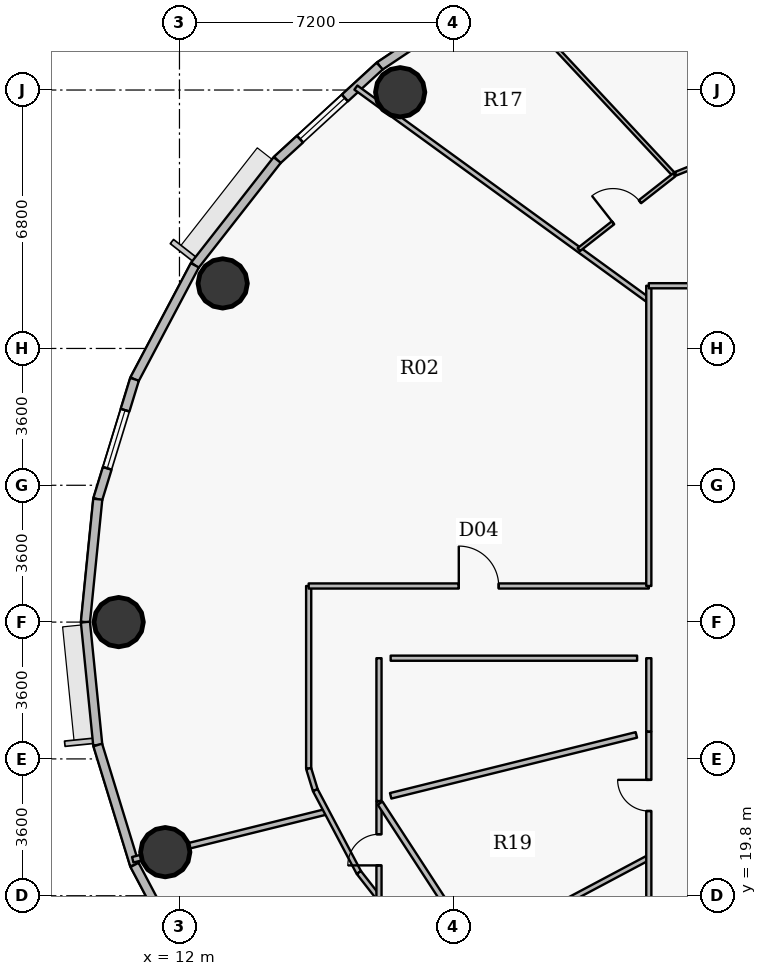
"""IFC4 building model, lengths in metres.
Left out: names, types, materials, properties, quantities, classifications, styles, units other than length and angle.
Written with IfcOpenShell. Run it as: python <this file> out.ifc"""

import sys

from ifc_helpers import new_model, si_unit, direction, frame, frame_2d, origin, origin_2d, place, context, subcontext, project, spatial, rectangle, hollow_circle, extrude, source, transform, mapped, element, fill, save


model = new_model("IFC4")
c1 = context("Model", 3, precision=1e-05, world=origin(), true_north=direction((0.0, 1.0)))
c2 = subcontext(c1, "Body", "Model", "MODEL_VIEW")
j1 = project(units=[si_unit("LENGTHUNIT", "METRE"), si_unit("PLANEANGLEUNIT", "RADIAN")], contexts=[c1])
p1 = place(None, origin())
s1 = spatial("IfcSite", under=j1, at=p1, CompositionType="ELEMENT")
p2 = place(p1, origin())
s2 = spatial("IfcBuilding", under=s1, at=p2, CompositionType="ELEMENT")
p3 = place(p2, frame((0.0, 0.0, 197.4)))
s3 = spatial("IfcBuildingStorey", under=s2, at=p3, CompositionType="ELEMENT", Elevation=197.4)
for number, where, z_axis, x_axis in (
    (1, (17.808, 40.942, 0.0), (0.0, 0.0, 1.0), (1.0, 0.0, 0.0)),
    (2, (13.137, 35.911, 0.0), (0.0, 0.0, 1.0), (1.0, 0.0, 0.0)),
    (3, (10.4, 27.0, 0.0), (0.0, 0.0, 1.0), (1.0, 0.0, 0.0)),
    (4, (11.625, 20.947, 0.0), (0.0, 0.0, 1.0), (1.0, 0.0, 0.0)),
):
    element("IfcColumn", number, at=place(p3, frame(where, z_axis=z_axis, x_axis=x_axis)), inside=s3, PredefinedType="COLUMN", context=c2, shape_type="SweptSolid", body=[
        extrude(hollow_circle(Radius=0.65, WallThickness=0.04, at=origin_2d()), origin(), (0.0, 0.0, 1.0), 3.75),
    ])
p4 = place(p3, frame((17.268, 41.631, 0.0), z_axis=(0.0, 0.0, 1.0), x_axis=(0.831228998277, 0.555930168657, 0.0)))
e5 = element("IfcWall", 5, at=p4, inside=s3, PredefinedType="SOLIDWALL", context=c2, shape_type="SweptSolid", body=[
    extrude(rectangle(XDim=3.8, YDim=0.24, at=frame_2d((1.9, 0.0))), origin(), (0.0, 0.0, 1.0), 3.5),
])
p5 = place(p3, frame((14.572, 39.158, 0.0), z_axis=(0.0, 0.0, 1.0), x_axis=(0.737076565834, 0.675809245349, 0.0)))
e6 = element("IfcWall", 6, at=p5, inside=s3, PredefinedType="SOLIDWALL", context=c2, shape_type="SweptSolid", body=[
    extrude(rectangle(XDim=3.658, YDim=0.24, at=frame_2d((1.829, 0.0))), origin(), (0.0, 0.0, 1.0), 3.5),
])
p6 = place(p5, frame((0.815, 0.0, 0.9)))
e7 = element("IfcOpeningElement", 7, at=p6, cuts=e6, PredefinedType="OPENING", context=c2, shape_type="SweptSolid", body=[
    extrude(rectangle(XDim=1.6, YDim=1.75, at=origin_2d()), frame((0.8, 0.13, 0.875), z_axis=(0.0, -1.0, 0.0), x_axis=(1.0, 0.0, 0.0)), (0.0, 0.0, 1.0), 0.26),
])
p7 = place(p3, frame((12.404, 36.388, 0.0), z_axis=(0.0, 0.0, 1.0), x_axis=(0.616287674549, 0.787521112224, 0.0)))
e8 = element("IfcWall", 8, at=p7, inside=s3, PredefinedType="SOLIDWALL", context=c2, shape_type="SweptSolid", body=[
    extrude(rectangle(XDim=3.517, YDim=0.24, at=frame_2d((1.759, 0.0))), origin(), (0.0, 0.0, 1.0), 3.5),
])
p8 = place(p3, frame((10.817, 33.389, 0.0), z_axis=(0.0, 0.0, 1.0), x_axis=(0.467586874938, 0.88394712194, 0.0)))
e9 = element("IfcWall", 9, at=p8, inside=s3, PredefinedType="SOLIDWALL", context=c2, shape_type="SweptSolid", body=[
    extrude(rectangle(XDim=3.393, YDim=0.24, at=frame_2d((1.697, 0.0))), origin(), (0.0, 0.0, 1.0), 3.5),
])
p9 = place(p3, frame((9.85, 30.234, 0.0), z_axis=(0.0, 0.0, 1.0), x_axis=(0.293097995113, 0.956082405058, 0.0)))
e10 = element("IfcWall", 10, at=p9, inside=s3, PredefinedType="SOLIDWALL", context=c2, shape_type="SweptSolid", body=[
    extrude(rectangle(XDim=3.3, YDim=0.24, at=frame_2d((1.65, 0.0))), origin(), (0.0, 0.0, 1.0), 3.5),
])
p10 = place(p9, frame((0.85, 0.0, 0.9)))
e11 = element("IfcOpeningElement", 11, at=p10, cuts=e10, PredefinedType="OPENING", context=c2, shape_type="SweptSolid", body=[
    extrude(rectangle(XDim=1.6, YDim=1.75, at=origin_2d()), frame((0.8, 0.13, 0.875), z_axis=(0.0, -1.0, 0.0), x_axis=(1.0, 0.0, 0.0)), (0.0, 0.0, 1.0), 0.26),
])
for number, where, z_axis, x_axis in (
    (12, (9.525, 27.0, 0.0), (0.0, 0.0, 1.0), (0.1, 0.995, 0.0)),
    (13, (9.85, 23.766, 0.0), (0.0, 0.0, 1.0), (-0.1, 0.995, 0.0)),
):
    element("IfcWall", number, at=place(p3, frame(where, z_axis=z_axis, x_axis=x_axis)), inside=s3, PredefinedType="SOLIDWALL", context=c2, shape_type="SweptSolid", body=[
        extrude(rectangle(XDim=3.25, YDim=0.24, at=frame_2d((1.625, 0.0))), origin(), (0.0, 0.0, 1.0), 3.5),
    ])
p11 = place(p3, frame((10.817, 20.611, 0.0), z_axis=(0.0, 0.0, 1.0), x_axis=(-0.293097995113, 0.956082405058, 0.0)))
e14 = element("IfcWall", 14, at=p11, inside=s3, PredefinedType="SOLIDWALL", context=c2, shape_type="SweptSolid", body=[
    extrude(rectangle(XDim=3.3, YDim=0.24, at=frame_2d((1.65, 0.0))), origin(), (0.0, 0.0, 1.0), 3.5),
])
p12 = place(p3, frame((12.404, 17.612, 0.0), z_axis=(0.0, 0.0, 1.0), x_axis=(-0.467586874938, 0.88394712194, 0.0)))
e15 = element("IfcWall", 15, at=p12, inside=s3, PredefinedType="SOLIDWALL", context=c2, shape_type="SweptSolid", body=[
    extrude(rectangle(XDim=3.393, YDim=0.24, at=frame_2d((1.697, 0.0))), origin(), (0.0, 0.0, 1.0), 3.5),
])
p13 = place(p3, frame((10.771, 20.747, 0.0), z_axis=(0.0, 0.0, 1.0), x_axis=(0.970640303721, 0.240535653891, 0.0)))
e16 = element("IfcWall", 16, at=p13, inside=s3, PredefinedType="PARTITIONING", context=c2, shape_type="SweptSolid", body=[
    extrude(rectangle(XDim=5.258, YDim=0.15, at=frame_2d((2.629, 0.0))), origin(), (0.0, 0.0, 1.0), 2.935),
])
p14 = place(p3, frame((15.4, 23.146, 0.0), z_axis=(0.0, 0.0, 1.0), x_axis=(0.0, 1.0, 0.0)))
e17 = element("IfcWall", 17, at=p14, inside=s3, PredefinedType="PARTITIONING", context=c2, shape_type="SweptSolid", body=[
    extrude(rectangle(XDim=4.804, YDim=0.135, at=frame_2d((2.402, 0.0))), origin(), (0.0, 0.0, 1.0), 2.935),
])
p15 = place(p3, frame((15.4, 23.146, 0.0), z_axis=(0.0, 0.0, 1.0), x_axis=(0.293335154151, -0.956009669061, 0.0)))
e18 = element("IfcWall", 18, at=p15, inside=s3, PredefinedType="PARTITIONING", context=c2, shape_type="SweptSolid", body=[
    extrude(rectangle(XDim=0.594, YDim=0.135, at=frame_2d((0.297, 0.0))), origin(), (0.0, 0.0, 1.0), 3.5),
])
p16 = place(p3, frame((15.4, 27.95, 0.0), z_axis=(0.0, 0.0, 1.0), x_axis=(1.0, 0.0, 0.0)))
e19 = element("IfcWall", 19, at=p16, inside=s3, PredefinedType="PARTITIONING", context=c2, shape_type="SweptSolid", body=[
    extrude(rectangle(XDim=8.95, YDim=0.135, at=frame_2d((4.475, 0.0))), origin(), (0.0, 0.0, 1.0), 3.5),
])
p17 = place(p16, frame((3.95, 0.0, 0.0)))
e20 = element("IfcOpeningElement", 20, at=p17, cuts=e19, PredefinedType="OPENING", context=c2, shape_type="SweptSolid", body=[
    extrude(rectangle(XDim=1.05, YDim=2.15, at=origin_2d()), frame((0.525, 0.078, 1.075), z_axis=(0.0, -1.0, 0.0), x_axis=(1.0, 0.0, 0.0)), (0.0, 0.0, 1.0), 0.155),
])
p18 = place(p3, frame((15.574, 22.578, 0.0), z_axis=(0.0, 0.0, 1.0), x_axis=(0.467530807018, -0.883976778252, 0.0)))
e21 = element("IfcWall", 21, at=p18, inside=s3, PredefinedType="PARTITIONING", context=c2, shape_type="SweptSolid", body=[
    extrude(rectangle(XDim=2.452, YDim=0.135, at=frame_2d((1.226, 0.0))), origin(), (0.0, 0.0, 1.0), 2.935),
])
p19 = place(p3, frame((16.643, 41.064, 0.0), z_axis=(0.0, 0.0, 1.0), x_axis=(0.809016355942, -0.587786131018, 0.0)))
e22 = element("IfcWall", 22, at=p19, inside=s3, PredefinedType="PARTITIONING", context=c2, shape_type="SweptSolid", body=[
    extrude(rectangle(XDim=9.527, YDim=0.135, at=frame_2d((4.764, 0.0))), origin(), (0.0, 0.0, 1.0), 2.935),
])
p20 = place(p3, frame((16.72, 20.411, 0.0), z_axis=(0.0, 0.0, 1.0), x_axis=(0.616377221056, -0.787451027914, 0.0)))
e23 = element("IfcWall", 23, at=p20, inside=s3, PredefinedType="PARTITIONING", context=c2, shape_type="SweptSolid", body=[
    extrude(rectangle(XDim=0.859, YDim=0.135, at=frame_2d((0.43, 0.0))), origin(), (0.0, 0.0, 1.0), 3.5),
])
p21 = place(p3, frame((17.25, 19.734, 0.0), z_axis=(0.0, 0.0, 1.0), x_axis=(0.0, 1.0, 0.0)))
e24 = element("IfcWall", 24, at=p21, inside=s3, PredefinedType="PARTITIONING", context=c2, shape_type="SweptSolid", body=[
    extrude(rectangle(XDim=2.548, YDim=0.135, at=frame_2d((1.274, 0.0))), origin(), (0.0, 0.0, 1.0), 2.935),
])
p22 = place(p21, frame((0.864, 0.0, 0.0)))
e25 = element("IfcOpeningElement", 25, at=p22, cuts=e24, PredefinedType="OPENING", context=c2, shape_type="SweptSolid", body=[
    extrude(rectangle(XDim=0.82, YDim=2.1, at=origin_2d()), frame((0.41, 0.078, 1.05), z_axis=(0.0, -1.0, 0.0), x_axis=(1.0, 0.0, 0.0)), (0.0, 0.0, 1.0), 0.155),
])
p23 = place(p3, frame((17.279, 22.237, 0.0), z_axis=(0.0, 0.0, 1.0), x_axis=(0.545383699519, -0.83818650687, 0.0)))
e26 = element("IfcWall", 26, at=p23, inside=s3, PredefinedType="PARTITIONING", context=c2, shape_type="SweptSolid", body=[
    extrude(rectangle(XDim=4.601, YDim=0.15, at=frame_2d((2.3, 0.0))), origin(), (0.0, 0.0, 1.0), 2.935),
])
p24 = place(p3, frame((20.39, 43.725, 0.0), z_axis=(0.0, 0.0, 1.0), x_axis=(0.682297728918, -0.73107442105, 0.0)))
e27 = element("IfcWall", 27, at=p24, inside=s3, PredefinedType="PARTITIONING", context=c2, shape_type="SweptSolid", body=[
    extrude(rectangle(XDim=6.782, YDim=0.1, at=frame_2d((3.391, 0.0))), origin(), (0.0, 0.0, 1.0), 2.935),
])
p25 = place(p3, frame((20.674, 18.851, 0.0), z_axis=(0.0, 0.0, 1.0), x_axis=(0.882934968765, 0.469495304483, 0.0)))
e28 = element("IfcWall", 28, at=p25, inside=s3, PredefinedType="PARTITIONING", context=c2, shape_type="SweptSolid", body=[
    extrude(rectangle(XDim=4.164, YDim=0.135, at=frame_2d((2.082, 0.0))), origin(), (0.0, 0.0, 1.0), 3.5),
])
p26 = place(p3, frame((22.509, 36.802, 0.0), z_axis=(0.0, 0.0, 1.0), x_axis=(0.787322269852, 0.616541680177, 0.0)))
e29 = element("IfcWall", 29, at=p26, inside=s3, PredefinedType="PARTITIONING", context=c2, shape_type="SweptSolid", body=[
    extrude(rectangle(XDim=3.187, YDim=0.1, at=frame_2d((1.593, 0.0))), origin(), (0.0, 0.0, 1.0), 2.935),
])
p27 = place(p26, frame((1.143, 0.0, 0.0)))
e30 = element("IfcOpeningElement", 30, at=p27, cuts=e29, PredefinedType="OPENING", context=c2, shape_type="SweptSolid", body=[
    extrude(rectangle(XDim=0.9, YDim=2.1, at=origin_2d()), frame((0.45, 0.06, 1.05), z_axis=(0.0, -1.0, 0.0), x_axis=(1.0, 0.0, 0.0)), (0.0, 0.0, 1.0), 0.12),
])
p28 = place(p3, frame((24.35, 18.15, 0.0), z_axis=(0.0, 0.0, 1.0), x_axis=(0.0, 1.0, 0.0)))
e31 = element("IfcWall", 31, at=p28, inside=s3, PredefinedType="PARTITIONING", context=c2, shape_type="SweptSolid", body=[
    extrude(rectangle(XDim=5.963, YDim=0.135, at=frame_2d((2.981, 0.0))), origin(), (0.0, 0.0, 1.0), 2.935),
])
p29 = place(p28, frame((3.879, 0.0, 0.0)))
e32 = element("IfcOpeningElement", 32, at=p29, cuts=e31, PredefinedType="OPENING", context=c2, shape_type="SweptSolid", body=[
    extrude(rectangle(XDim=0.82, YDim=2.1, at=origin_2d()), frame((0.41, 0.078, 1.05), z_axis=(0.0, -1.0, 0.0), x_axis=(1.0, 0.0, 0.0)), (0.0, 0.0, 1.0), 0.155),
])
p30 = place(p3, frame((24.35, 27.95, 0.0), z_axis=(0.0, 0.0, 1.0), x_axis=(0.0, 1.0, 0.0)))
e33 = element("IfcWall", 33, at=p30, inside=s3, PredefinedType="PARTITIONING", context=c2, shape_type="SweptSolid", body=[
    extrude(rectangle(XDim=7.9, YDim=0.135, at=frame_2d((3.95, 0.0))), origin(), (0.0, 0.0, 1.0), 2.935),
])
p31 = place(p3, frame((24.35, 35.85, 0.0), z_axis=(0.0, 0.0, 1.0), x_axis=(1.0, 0.0, 0.0)))
e34 = element("IfcWall", 34, at=p31, inside=s3, PredefinedType="PARTITIONING", context=c2, shape_type="SweptSolid", body=[
    extrude(rectangle(XDim=11.942, YDim=0.135, at=frame_2d((5.971, 0.0))), origin(), (0.0, 0.0, 1.0), 2.935),
])
p32 = place(p31, frame((5.471, 0.0, 0.0)))
e35 = element("IfcOpeningElement", 35, at=p32, cuts=e34, PredefinedType="OPENING", context=c2, shape_type="SweptSolid", body=[
    extrude(rectangle(XDim=1.0, YDim=2.15, at=origin_2d()), frame((0.5, 0.078, 1.075), z_axis=(0.0, -1.0, 0.0), x_axis=(1.0, 0.0, 0.0)), (0.0, 0.0, 1.0), 0.155),
])
p33 = place(p3, frame((25.055, 38.796, 0.0), z_axis=(0.0, 0.0, 1.0), x_axis=(0.928801214375, 0.370578337434, 0.0)))
e36 = element("IfcWall", 36, at=p33, inside=s3, PredefinedType="PARTITIONING", context=c2, shape_type="SweptSolid", body=[
    extrude(rectangle(XDim=4.664, YDim=0.1, at=frame_2d((2.332, 0.0))), origin(), (0.0, 0.0, 1.0), 3.5),
])
p34 = place(p3, frame((17.25, 26.05, 0.0), z_axis=(0.0, 0.0, 1.0), x_axis=(0.0, -1.0, 0.0)))
e37 = element("IfcWall", 37, at=p34, inside=s3, PredefinedType="PARTITIONING", context=c2, shape_type="SweptSolid", body=[
    extrude(rectangle(XDim=3.758, YDim=0.135, at=frame_2d((1.879, 0.0))), origin(), (0.0, 0.0, 1.0), 2.935),
])
p35 = place(p3, frame((24.35, 24.123, 0.0), z_axis=(0.0, 0.0, 1.0), x_axis=(0.0, 1.0, 0.0)))
e38 = element("IfcWall", 38, at=p35, inside=s3, PredefinedType="PARTITIONING", context=c2, shape_type="SweptSolid", body=[
    extrude(rectangle(XDim=1.927, YDim=0.135, at=frame_2d((0.964, 0.0))), origin(), (0.0, 0.0, 1.0), 2.935),
])
p36 = place(p3, frame((24.042, 26.05, 0.0), z_axis=(0.0, 0.0, 1.0), x_axis=(-1.0, 0.0, 0.0)))
e39 = element("IfcWall", 39, at=p36, inside=s3, PredefinedType="PARTITIONING", context=c2, shape_type="SweptSolid", body=[
    extrude(rectangle(XDim=6.485, YDim=0.135, at=frame_2d((3.242, 0.0))), origin(), (0.0, 0.0, 1.0), 3.5),
])
p37 = place(p3, frame((17.558, 22.429, 0.0), z_axis=(0.0, 0.0, 1.0), x_axis=(0.970632119323, 0.240568678214, 0.0)))
e40 = element("IfcWall", 40, at=p37, inside=s3, PredefinedType="PARTITIONING", context=c2, shape_type="SweptSolid", body=[
    extrude(rectangle(XDim=6.66, YDim=0.15, at=frame_2d((3.33, 0.0))), origin(), (0.0, 0.0, 1.0), 2.935),
])
m1 = source(origin(), c2, "Body", "SweptSolid", [
    extrude(rectangle(XDim=1.6, YDim=1.75, at=origin_2d()), frame((0.8, 0.03, 0.875), z_axis=(0.0, -1.0, 0.0), x_axis=(1.0, 0.0, 0.0)), (0.0, 0.0, 1.0), 0.06),
])
p38 = place(p6, origin())
e41 = element("IfcWindow", 41, at=p38, inside=s3, PartitioningType="DOUBLE_PANEL_VERTICAL", PredefinedType="WINDOW", context=c2, shape_type="MappedRepresentation", body=[
    mapped(m1, transform((0.0, 0.0, 0.0), x_axis=(1.0, 0.0, 0.0), y_axis=(0.0, 1.0, 0.0), z_axis=(0.0, 0.0, 1.0), scale=1.0)),
])
fill(e7, e41)
p39 = place(p10, origin())
e42 = element("IfcWindow", 42, at=p39, inside=s3, PartitioningType="DOUBLE_PANEL_VERTICAL", PredefinedType="WINDOW", context=c2, shape_type="MappedRepresentation", body=[
    mapped(m1, transform((0.0, 0.0, 0.0), x_axis=(1.0, 0.0, 0.0), y_axis=(0.0, 1.0, 0.0), z_axis=(0.0, 0.0, 1.0), scale=1.0)),
])
fill(e11, e42)
m2 = source(origin(), c2, "Body", "SweptSolid", [
    extrude(rectangle(XDim=0.9, YDim=2.1, at=origin_2d()), frame((0.45, 0.025, 1.05), z_axis=(0.0, -1.0, 0.0), x_axis=(1.0, 0.0, 0.0)), (0.0, 0.0, 1.0), 0.05),
])
p40 = place(p27, origin())
e43 = element("IfcDoor", 43, at=p40, inside=s3, OperationType="SINGLE_SWING_LEFT", PredefinedType="DOOR", context=c2, shape_type="MappedRepresentation", body=[
    mapped(m2, transform((0.0, 0.0, 0.0), x_axis=(1.0, 0.0, 0.0), y_axis=(0.0, 1.0, 0.0), z_axis=(0.0, 0.0, 1.0), scale=1.0)),
])
fill(e30, e43)
m3 = source(origin(), c2, "Body", "SweptSolid", [
    extrude(rectangle(XDim=1.05, YDim=2.15, at=origin_2d()), frame((0.525, 0.025, 1.075), z_axis=(0.0, -1.0, 0.0), x_axis=(1.0, 0.0, 0.0)), (0.0, 0.0, 1.0), 0.05),
])
p41 = place(p17, origin())
e44 = element("IfcDoor", 44, at=p41, inside=s3, OperationType="SINGLE_SWING_LEFT", PredefinedType="DOOR", context=c2, shape_type="MappedRepresentation", body=[
    mapped(m3, transform((0.0, 0.0, 0.0), x_axis=(1.0, 0.0, 0.0), y_axis=(0.0, 1.0, 0.0), z_axis=(0.0, 0.0, 1.0), scale=1.0)),
])
fill(e20, e44)
m4 = source(origin(), c2, "Body", "SweptSolid", [
    extrude(rectangle(XDim=0.82, YDim=2.1, at=origin_2d()), frame((0.41, 0.025, 1.05), z_axis=(0.0, -1.0, 0.0), x_axis=(1.0, 0.0, 0.0)), (0.0, 0.0, 1.0), 0.05),
])
p42 = place(p29, origin())
e45 = element("IfcDoor", 45, at=p42, inside=s3, OperationType="SINGLE_SWING_RIGHT", PredefinedType="DOOR", context=c2, shape_type="MappedRepresentation", body=[
    mapped(m4, transform((0.0, 0.0, 0.0), x_axis=(1.0, 0.0, 0.0), y_axis=(0.0, 1.0, 0.0), z_axis=(0.0, 0.0, 1.0), scale=1.0)),
])
fill(e32, e45)
p43 = place(p22, origin())
e46 = element("IfcDoor", 46, at=p43, inside=s3, OperationType="SINGLE_SWING_LEFT", PredefinedType="DOOR", context=c2, shape_type="MappedRepresentation", body=[
    mapped(m4, transform((0.0, 0.0, 0.0), x_axis=(1.0, 0.0, 0.0), y_axis=(0.0, 1.0, 0.0), z_axis=(0.0, 0.0, 1.0), scale=1.0)),
])
fill(e25, e46)
save(model, sys.argv[1])
